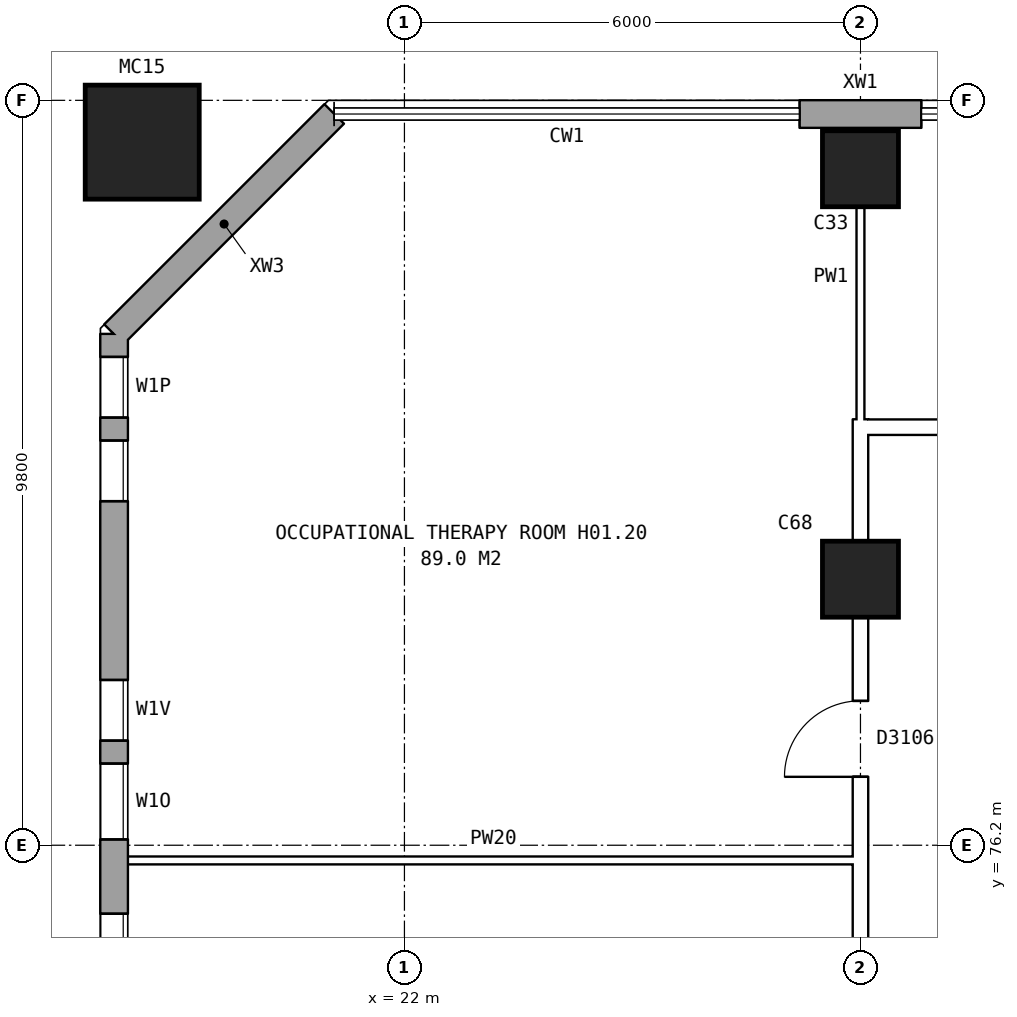
"""IFC4 building model, lengths in metres.
Left out: names, types, materials, properties, quantities, classifications, styles, units other than length and angle.
Written with IfcOpenShell. Run it as: python <this file> out.ifc"""

import sys

from ifc_helpers import new_model, si_unit, direction, frame, frame_2d, origin, origin_2d, place, context, subcontext, project, spatial, rectangle, hollow_rectangle, extrude, element, fill, save


model = new_model("IFC4")
c1 = context("Model", 3, precision=1e-05, world=origin(), true_north=direction((0.0, 1.0)))
c2 = subcontext(c1, "Body", "Model", "MODEL_VIEW")
j1 = project(units=[si_unit("LENGTHUNIT", "METRE"), si_unit("PLANEANGLEUNIT", "RADIAN")], contexts=[c1])
p1 = place(None, origin())
s1 = spatial("IfcSite", under=j1, at=p1, CompositionType="ELEMENT")
p2 = place(p1, origin())
s2 = spatial("IfcBuilding", under=s1, at=p2, CompositionType="ELEMENT")
p3 = place(p2, frame((0.0, 0.0, 5.5)))
s3 = spatial("IfcBuildingStorey", under=s2, at=p3, CompositionType="ELEMENT", Elevation=5.5)
for number, where, z_axis, x_axis in (
    (1, (28.0, 79.7, 0.0), (0.0, 0.0, 1.0), (1.0, 0.0, 0.0)),
    (2, (28.0, 85.1, 0.0), (0.0, 0.0, 1.0), (1.0, 0.0, 0.0)),
):
    element("IfcColumn", number, at=place(p3, frame(where, z_axis=z_axis, x_axis=x_axis)), inside=s3, PredefinedType="COLUMN", context=c2, shape_type="SweptSolid", body=[
        extrude(rectangle(XDim=1.0, YDim=1.0, at=origin_2d()), origin(), (0.0, 0.0, 1.0), 4.3),
    ])
p4 = place(p3, frame((18.55, 85.45, 0.0), z_axis=(0.0, 0.0, 1.0), x_axis=(1.0, 0.0, 0.0)))
e3 = element("IfcColumn", 3, at=p4, inside=s3, PredefinedType="COLUMN", context=c2, shape_type="SweptSolid", body=[
    extrude(hollow_rectangle(XDim=1.5, YDim=1.5, WallThickness=0.08, at=origin_2d()), origin(), (0.0, 0.0, 1.0), 4.6),
])
p5 = place(p3, frame((28.8, 85.82, 0.0), z_axis=(0.0, 0.0, 1.0), x_axis=(-1.0, 0.0, 0.0)))
e4 = element("IfcWall", 4, at=p5, inside=s3, PredefinedType="STANDARD", context=c2, shape_type="SweptSolid", body=[
    extrude(rectangle(XDim=1.6, YDim=0.36, at=frame_2d((0.8, 0.0))), origin(), (0.0, 0.0, 1.0), 4.3),
])
p6 = place(p3, frame((21.075, 85.82, 0.0), z_axis=(0.0, 0.0, 1.0), x_axis=(-0.707106781187, -0.707106781187, 0.0)))
e5 = element("IfcWall", 5, at=p6, inside=s3, PredefinedType="STANDARD", context=c2, shape_type="SweptSolid", body=[
    extrude(rectangle(XDim=4.094, YDim=0.36, at=frame_2d((2.047, 0.0))), origin(), (0.0, 0.0, 1.0), 4.3),
])
p7 = place(p3, frame((18.18, 82.925, 0.0), z_axis=(0.0, 0.0, 1.0), x_axis=(0.0, -1.0, 0.0)))
e6 = element("IfcWall", 6, at=p7, inside=s3, PredefinedType="STANDARD", context=c2, shape_type="SweptSolid", body=[
    extrude(rectangle(XDim=25.851, YDim=0.36, at=frame_2d((12.925, 0.0))), origin(), (0.0, 0.0, 1.0), 4.3),
])
p8 = place(p7, frame((0.3, 0.0, 1.4)))
e7 = element("IfcOpeningElement", 7, at=p8, cuts=e6, PredefinedType="OPENING", context=c2, shape_type="SweptSolid", body=[
    extrude(rectangle(XDim=0.8, YDim=1.2, at=frame_2d((0.4, 0.6))), frame((0.0, 0.19, 0.0), z_axis=(0.0, -1.0, 0.0), x_axis=(1.0, 0.0, 0.0)), (0.0, 0.0, 1.0), 0.38),
])
p9 = place(p7, frame((1.4, 0.0, 1.7)))
e8 = element("IfcOpeningElement", 8, at=p9, cuts=e6, PredefinedType="OPENING", context=c2, shape_type="SweptSolid", body=[
    extrude(rectangle(XDim=0.8, YDim=0.9, at=frame_2d((0.4, 0.45))), frame((0.0, 0.19, 0.0), z_axis=(0.0, -1.0, 0.0), x_axis=(1.0, 0.0, 0.0)), (0.0, 0.0, 1.0), 0.38),
])
p10 = place(p7, frame((7.625, 0.0, 0.8)))
e9 = element("IfcOpeningElement", 9, at=p10, cuts=e6, PredefinedType="OPENING", context=c2, shape_type="SweptSolid", body=[
    extrude(rectangle(XDim=1.6, YDim=1.8, at=frame_2d((0.8, 0.9))), frame((0.0, 0.19, 0.0), z_axis=(0.0, -1.0, 0.0), x_axis=(1.0, 0.0, 0.0)), (0.0, 0.0, 1.0), 0.38),
])
p11 = place(p7, frame((10.625, 0.0, 0.8)))
e10 = element("IfcOpeningElement", 10, at=p11, cuts=e6, PredefinedType="OPENING", context=c2, shape_type="SweptSolid", body=[
    extrude(rectangle(XDim=1.6, YDim=1.8, at=frame_2d((0.8, 0.9))), frame((0.0, 0.19, 0.0), z_axis=(0.0, -1.0, 0.0), x_axis=(1.0, 0.0, 0.0)), (0.0, 0.0, 1.0), 0.38),
])
p12 = place(p7, frame((13.625, 0.0, 0.8)))
e11 = element("IfcOpeningElement", 11, at=p12, cuts=e6, PredefinedType="OPENING", context=c2, shape_type="SweptSolid", body=[
    extrude(rectangle(XDim=1.6, YDim=1.8, at=frame_2d((0.8, 0.9))), frame((0.0, 0.19, 0.0), z_axis=(0.0, -1.0, 0.0), x_axis=(1.0, 0.0, 0.0)), (0.0, 0.0, 1.0), 0.38),
])
p13 = place(p7, frame((16.625, 0.0, 0.8)))
e12 = element("IfcOpeningElement", 12, at=p13, cuts=e6, PredefinedType="OPENING", context=c2, shape_type="SweptSolid", body=[
    extrude(rectangle(XDim=1.6, YDim=1.8, at=frame_2d((0.8, 0.9))), frame((0.0, 0.19, 0.0), z_axis=(0.0, -1.0, 0.0), x_axis=(1.0, 0.0, 0.0)), (0.0, 0.0, 1.0), 0.38),
])
p14 = place(p7, frame((19.075, 0.0, 0.8)))
e13 = element("IfcOpeningElement", 13, at=p14, cuts=e6, PredefinedType="OPENING", context=c2, shape_type="SweptSolid", body=[
    extrude(rectangle(XDim=1.0, YDim=1.2, at=frame_2d((0.5, 0.6))), frame((0.0, 0.19, 0.0), z_axis=(0.0, -1.0, 0.0), x_axis=(1.0, 0.0, 0.0)), (0.0, 0.0, 1.0), 0.38),
])
p15 = place(p7, frame((20.375, 0.0, 0.8)))
e14 = element("IfcOpeningElement", 14, at=p15, cuts=e6, PredefinedType="OPENING", context=c2, shape_type="SweptSolid", body=[
    extrude(rectangle(XDim=0.8, YDim=0.9, at=frame_2d((0.4, 0.45))), frame((0.0, 0.19, 0.0), z_axis=(0.0, -1.0, 0.0), x_axis=(1.0, 0.0, 0.0)), (0.0, 0.0, 1.0), 0.38),
])
p16 = place(p7, frame((4.55, 0.0, 0.8)))
e15 = element("IfcOpeningElement", 15, at=p16, cuts=e6, PredefinedType="OPENING", context=c2, shape_type="SweptSolid", body=[
    extrude(rectangle(XDim=0.8, YDim=0.9, at=frame_2d((0.4, 0.45))), frame((0.0, 0.19, 0.0), z_axis=(0.0, -1.0, 0.0), x_axis=(1.0, 0.0, 0.0)), (0.0, 0.0, 1.0), 0.38),
])
p17 = place(p7, frame((5.65, 0.0, 0.8)))
e16 = element("IfcOpeningElement", 16, at=p17, cuts=e6, PredefinedType="OPENING", context=c2, shape_type="SweptSolid", body=[
    extrude(rectangle(XDim=1.0, YDim=1.2, at=frame_2d((0.5, 0.6))), frame((0.0, 0.19, 0.0), z_axis=(0.0, -1.0, 0.0), x_axis=(1.0, 0.0, 0.0)), (0.0, 0.0, 1.0), 0.38),
])
p18 = place(p7, frame((23.525, 0.0, 1.7)))
e17 = element("IfcOpeningElement", 17, at=p18, cuts=e6, PredefinedType="OPENING", context=c2, shape_type="SweptSolid", body=[
    extrude(rectangle(XDim=0.8, YDim=0.9, at=frame_2d((0.4, 0.45))), frame((0.0, 0.19, 0.0), z_axis=(0.0, -1.0, 0.0), x_axis=(1.0, 0.0, 0.0)), (0.0, 0.0, 1.0), 0.38),
])
p19 = place(p7, frame((24.625, 0.0, 1.4)))
e18 = element("IfcOpeningElement", 18, at=p19, cuts=e6, PredefinedType="OPENING", context=c2, shape_type="SweptSolid", body=[
    extrude(rectangle(XDim=0.8, YDim=1.2, at=frame_2d((0.4, 0.6))), frame((0.0, 0.19, 0.0), z_axis=(0.0, -1.0, 0.0), x_axis=(1.0, 0.0, 0.0)), (0.0, 0.0, 1.0), 0.38),
])
p20 = place(p3, frame((18.24, 76.0, 0.0), z_axis=(0.0, 0.0, 1.0), x_axis=(1.0, 0.0, 0.0)))
e19 = element("IfcWall", 19, at=p20, inside=s3, PredefinedType="PARTITIONING", context=c2, shape_type="SweptSolid", body=[
    extrude(rectangle(XDim=9.86, YDim=0.1, at=frame_2d((4.93, 0.0))), origin(), (0.0, 0.0, 1.0), 4.3),
])
p21 = place(p3, frame((27.9, 81.7, 0.0), z_axis=(0.0, 0.0, 1.0), x_axis=(1.0, 0.0, 0.0)))
e20 = element("IfcWall", 20, at=p21, inside=s3, PredefinedType="PARTITIONING", context=c2, shape_type="SweptSolid", body=[
    extrude(rectangle(XDim=16.12, YDim=0.2, at=frame_2d((8.06, 0.0))), origin(), (0.0, 0.0, 1.0), 4.3),
])
p22 = place(p21, frame((2.6, 0.0, 0.0)))
e21 = element("IfcOpeningElement", 21, at=p22, cuts=e20, PredefinedType="OPENING", context=c2, shape_type="SweptSolid", body=[
    extrude(rectangle(XDim=1.0, YDim=2.1, at=frame_2d((0.5, 1.05))), frame((0.0, 0.11, 0.0), z_axis=(0.0, -1.0, 0.0), x_axis=(1.0, 0.0, 0.0)), (0.0, 0.0, 1.0), 0.22),
])
p23 = place(p21, frame((7.1, 0.0, 0.0)))
e22 = element("IfcOpeningElement", 22, at=p23, cuts=e20, PredefinedType="OPENING", context=c2, shape_type="SweptSolid", body=[
    extrude(rectangle(XDim=1.0, YDim=2.1, at=frame_2d((0.5, 1.05))), frame((0.0, 0.11, 0.0), z_axis=(0.0, -1.0, 0.0), x_axis=(1.0, 0.0, 0.0)), (0.0, 0.0, 1.0), 0.22),
])
p24 = place(p21, frame((10.1, 0.0, 0.0)))
e23 = element("IfcOpeningElement", 23, at=p24, cuts=e20, PredefinedType="OPENING", context=c2, shape_type="SweptSolid", body=[
    extrude(rectangle(XDim=1.0, YDim=2.1, at=frame_2d((0.5, 1.05))), frame((0.0, 0.11, 0.0), z_axis=(0.0, -1.0, 0.0), x_axis=(1.0, 0.0, 0.0)), (0.0, 0.0, 1.0), 0.22),
])
p25 = place(p21, frame((13.55, 0.0, 0.0)))
e24 = element("IfcOpeningElement", 24, at=p25, cuts=e20, PredefinedType="OPENING", context=c2, shape_type="SweptSolid", body=[
    extrude(rectangle(XDim=1.0, YDim=2.1, at=frame_2d((0.5, 1.05))), frame((0.0, 0.11, 0.0), z_axis=(0.0, -1.0, 0.0), x_axis=(1.0, 0.0, 0.0)), (0.0, 0.0, 1.0), 0.22),
])
p26 = place(p3, frame((28.0, 58.198, 0.0), z_axis=(0.0, 0.0, 1.0), x_axis=(0.0, 1.0, 0.0)))
e25 = element("IfcWall", 25, at=p26, inside=s3, PredefinedType="PARTITIONING", context=c2, shape_type="SweptSolid", body=[
    extrude(rectangle(XDim=23.604, YDim=0.2, at=frame_2d((11.802, 0.0))), origin(), (0.0, 0.0, 1.0), 4.3),
])
p27 = place(p26, frame((3.602, 0.0, 0.0)))
e26 = element("IfcOpeningElement", 26, at=p27, cuts=e25, PredefinedType="OPENING", context=c2, shape_type="SweptSolid", body=[
    extrude(rectangle(XDim=1.2, YDim=2.1, at=frame_2d((0.6, 1.05))), frame((0.0, 0.11, 0.0), z_axis=(0.0, -1.0, 0.0), x_axis=(1.0, 0.0, 0.0)), (0.0, 0.0, 1.0), 0.22),
])
p28 = place(p26, frame((8.202, 0.0, 0.0)))
e27 = element("IfcOpeningElement", 27, at=p28, cuts=e25, PredefinedType="OPENING", context=c2, shape_type="SweptSolid", body=[
    extrude(rectangle(XDim=1.2, YDim=2.1, at=frame_2d((0.6, 1.05))), frame((0.0, 0.11, 0.0), z_axis=(0.0, -1.0, 0.0), x_axis=(1.0, 0.0, 0.0)), (0.0, 0.0, 1.0), 0.22),
])
p29 = place(p26, frame((14.302, 0.0, 0.0)))
e28 = element("IfcOpeningElement", 28, at=p29, cuts=e25, PredefinedType="OPENING", context=c2, shape_type="SweptSolid", body=[
    extrude(rectangle(XDim=1.0, YDim=2.1, at=frame_2d((0.5, 1.05))), frame((0.0, 0.11, 0.0), z_axis=(0.0, -1.0, 0.0), x_axis=(1.0, 0.0, 0.0)), (0.0, 0.0, 1.0), 0.22),
])
p30 = place(p26, frame((18.902, 0.0, 0.0)))
e29 = element("IfcOpeningElement", 29, at=p30, cuts=e25, PredefinedType="OPENING", context=c2, shape_type="SweptSolid", body=[
    extrude(rectangle(XDim=1.0, YDim=2.1, at=frame_2d((0.5, 1.05))), frame((0.0, 0.11, 0.0), z_axis=(0.0, -1.0, 0.0), x_axis=(1.0, 0.0, 0.0)), (0.0, 0.0, 1.0), 0.22),
])
p31 = place(p3, frame((28.0, 81.598, 0.0), z_axis=(0.0, 0.0, 1.0), x_axis=(0.0, 1.0, 0.0)))
e30 = element("IfcWall", 30, at=p31, inside=s3, PredefinedType="PARTITIONING", context=c2, shape_type="SweptSolid", body=[
    extrude(rectangle(XDim=4.162, YDim=0.1, at=frame_2d((2.081, 0.0))), origin(), (0.0, 0.0, 1.0), 4.3),
])
p32 = place(p8, origin())
e31 = element("IfcWindow", 31, at=p32, inside=s3, PartitioningType="SINGLE_PANEL", PredefinedType="WINDOW", context=c2, shape_type="SweptSolid", body=[
    extrude(rectangle(XDim=0.8, YDim=1.2, at=frame_2d((0.4, 0.6))), frame((0.0, 0.15, 0.0), z_axis=(0.0, -1.0, 0.0), x_axis=(1.0, 0.0, 0.0)), (0.0, 0.0, 1.0), 0.06),
])
fill(e7, e31)
p33 = place(p9, origin())
e32 = element("IfcWindow", 32, at=p33, inside=s3, PartitioningType="SINGLE_PANEL", PredefinedType="WINDOW", context=c2, shape_type="SweptSolid", body=[
    extrude(rectangle(XDim=0.8, YDim=0.9, at=frame_2d((0.4, 0.45))), frame((0.0, 0.15, 0.0), z_axis=(0.0, -1.0, 0.0), x_axis=(1.0, 0.0, 0.0)), (0.0, 0.0, 1.0), 0.06),
])
fill(e8, e32)
p34 = place(p10, origin())
e33 = element("IfcWindow", 33, at=p34, inside=s3, PartitioningType="SINGLE_PANEL", PredefinedType="WINDOW", context=c2, shape_type="SweptSolid", body=[
    extrude(rectangle(XDim=1.6, YDim=1.8, at=frame_2d((0.8, 0.9))), frame((0.0, 0.15, 0.0), z_axis=(0.0, -1.0, 0.0), x_axis=(1.0, 0.0, 0.0)), (0.0, 0.0, 1.0), 0.06),
])
fill(e9, e33)
p35 = place(p30, origin())
e34 = element("IfcDoor", 34, at=p35, inside=s3, OperationType="SINGLE_SWING_LEFT", PredefinedType="DOOR", context=c2, shape_type="SweptSolid", body=[
    extrude(rectangle(XDim=1.0, YDim=2.1, at=frame_2d((0.5, 1.05))), frame((0.0, 0.025, 0.0), z_axis=(0.0, -1.0, 0.0), x_axis=(1.0, 0.0, 0.0)), (0.0, 0.0, 1.0), 0.05),
])
fill(e29, e34)
p36 = place(p16, origin())
e35 = element("IfcWindow", 35, at=p36, inside=s3, PartitioningType="SINGLE_PANEL", PredefinedType="WINDOW", context=c2, shape_type="SweptSolid", body=[
    extrude(rectangle(XDim=0.8, YDim=0.9, at=frame_2d((0.4, 0.45))), frame((0.0, 0.15, 0.0), z_axis=(0.0, -1.0, 0.0), x_axis=(1.0, 0.0, 0.0)), (0.0, 0.0, 1.0), 0.06),
])
fill(e15, e35)
p37 = place(p17, origin())
e36 = element("IfcWindow", 36, at=p37, inside=s3, PartitioningType="SINGLE_PANEL", PredefinedType="WINDOW", context=c2, shape_type="SweptSolid", body=[
    extrude(rectangle(XDim=1.0, YDim=1.2, at=frame_2d((0.5, 0.6))), frame((0.0, 0.15, 0.0), z_axis=(0.0, -1.0, 0.0), x_axis=(1.0, 0.0, 0.0)), (0.0, 0.0, 1.0), 0.06),
])
fill(e16, e36)
save(model, sys.argv[1])
